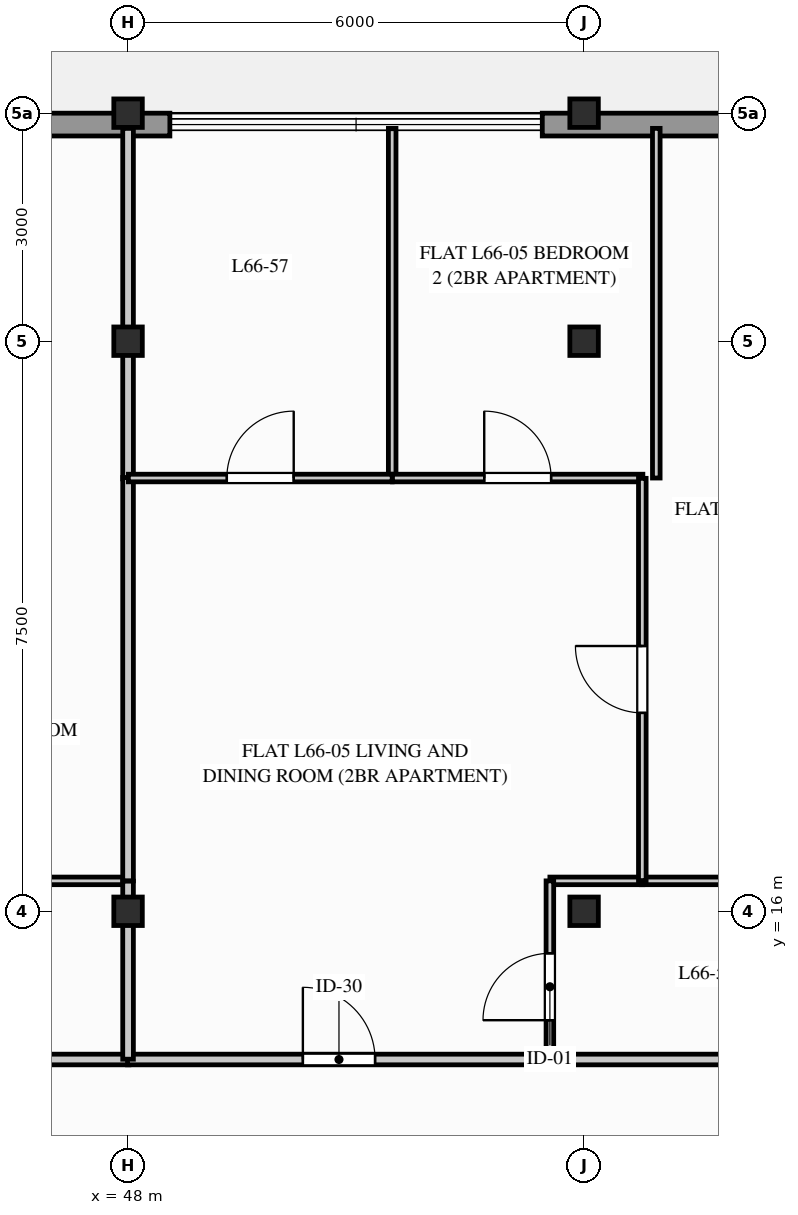
"""IFC4 building model, lengths in metres.
Left out: names, types, materials, properties, quantities, classifications, styles, units other than length and angle.
Written with IfcOpenShell. Run it as: python <this file> out.ifc"""

import sys

from ifc_helpers import new_model, si_unit, direction, frame, frame_2d, origin, origin_2d, place, context, subcontext, project, spatial, rectangle, i_section, extrude, element, fill, save


model = new_model("IFC4")
c1 = context("Model", 3, precision=1e-05, world=origin(), true_north=direction((0.0, 1.0)))
c2 = subcontext(c1, "Body", "Model", "MODEL_VIEW")
j1 = project(units=[si_unit("LENGTHUNIT", "METRE"), si_unit("PLANEANGLEUNIT", "RADIAN")], contexts=[c1])
p1 = place(None, origin())
s1 = spatial("IfcSite", under=j1, at=p1, CompositionType="ELEMENT")
p2 = place(p1, origin())
s2 = spatial("IfcBuilding", under=s1, at=p2, CompositionType="ELEMENT")
p3 = place(p2, frame((0.0, 0.0, 218.0)))
s3 = spatial("IfcBuildingStorey", under=s2, at=p3, CompositionType="ELEMENT", Elevation=218.0)
for number, where, z_axis, x_axis in (
    (1, (48.0, 16.0, 0.0), (0.0, 0.0, 1.0), (1.0, 0.0, 0.0)),
    (2, (48.0, 23.5, 0.0), (0.0, 0.0, 1.0), (1.0, 0.0, 0.0)),
    (3, (48.0, 26.5, 0.0), (0.0, 0.0, 1.0), (1.0, 0.0, 0.0)),
    (4, (54.0, 16.0, 0.0), (0.0, 0.0, 1.0), (1.0, 0.0, 0.0)),
    (5, (54.0, 23.5, 0.0), (0.0, 0.0, 1.0), (1.0, 0.0, 0.0)),
    (6, (54.0, 26.5, 0.0), (0.0, 0.0, 1.0), (1.0, 0.0, 0.0)),
):
    element("IfcColumn", number, at=place(p3, frame(where, z_axis=z_axis, x_axis=x_axis)), inside=s3, PredefinedType="COLUMN", context=c2, shape_type="SweptSolid", body=[
        extrude(i_section(OverallWidth=0.375, OverallDepth=0.375, WebThickness=0.017, FlangeThickness=0.027, FilletRadius=0.015, at=origin_2d()), origin(), (0.0, 0.0, 1.0), 3.1),
    ])
p4 = place(p3, frame((53.45, 26.35, 0.0), z_axis=(0.0, 0.0, 1.0), x_axis=(1.0, 0.0, 0.0)))
e7 = element("IfcWall", 7, at=p4, inside=s3, PredefinedType="STANDARD", context=c2, shape_type="SweptSolid", body=[
    extrude(rectangle(XDim=4.05, YDim=0.3, at=frame_2d((2.025, 0.0))), origin(), (0.0, 0.0, 1.0), 2.89),
])
p5 = place(p3, frame((32.2, 26.35, 0.0), z_axis=(0.0, 0.0, 1.0), x_axis=(1.0, 0.0, 0.0)))
e8 = element("IfcWall", 8, at=p5, inside=s3, PredefinedType="STANDARD", context=c2, shape_type="SweptSolid", body=[
    extrude(rectangle(XDim=16.35, YDim=0.3, at=frame_2d((8.175, 0.0))), origin(), (0.0, 0.0, 1.0), 2.332),
])
p6 = place(p5, frame((7.6, 0.0, 0.0)))
e9 = element("IfcOpeningElement", 9, at=p6, cuts=e8, PredefinedType="OPENING", context=c2, shape_type="SweptSolid", body=[
    extrude(rectangle(XDim=1.1, YDim=2.2, at=frame_2d((0.55, 1.1))), frame((0.0, 0.16, 0.0), z_axis=(0.0, -1.0, 0.0), x_axis=(1.0, 0.0, 0.0)), (0.0, 0.0, 1.0), 0.32),
])
p7 = place(p5, frame((11.5, 0.0, 0.512)))
e10 = element("IfcOpeningElement", 10, at=p7, cuts=e8, PredefinedType="OPENING", context=c2, shape_type="SweptSolid", body=[
    extrude(rectangle(XDim=1.2, YDim=1.6, at=frame_2d((0.6, 0.8))), frame((0.0, 0.16, 0.0), z_axis=(0.0, -1.0, 0.0), x_axis=(1.0, 0.0, 0.0)), (0.0, 0.0, 1.0), 0.32),
])
p8 = place(p5, frame((4.006, 0.0, 0.512)))
e11 = element("IfcOpeningElement", 11, at=p8, cuts=e8, PredefinedType="OPENING", context=c2, shape_type="SweptSolid", body=[
    extrude(rectangle(XDim=1.2, YDim=1.6, at=frame_2d((0.6, 0.8))), frame((0.0, 0.16, 0.0), z_axis=(0.0, -1.0, 0.0), x_axis=(1.0, 0.0, 0.0)), (0.0, 0.0, 1.0), 0.32),
])
p9 = place(p3, frame((41.743, 14.05, 0.0), z_axis=(0.0, 0.0, 1.0), x_axis=(1.0, 0.0, 0.0)))
e12 = element("IfcWall", 12, at=p9, inside=s3, PredefinedType="PARTITIONING", context=c2, shape_type="SweptSolid", body=[
    extrude(rectangle(XDim=6.269, YDim=0.14, at=frame_2d((3.134, 0.0))), origin(), (0.0, 0.0, 1.0), 2.325),
])
p10 = place(p9, frame((2.659, 0.0, 0.0)))
e13 = element("IfcOpeningElement", 13, at=p10, cuts=e12, PredefinedType="OPENING", context=c2, shape_type="SweptSolid", body=[
    extrude(rectangle(XDim=0.95, YDim=2.05, at=frame_2d((0.475, 1.025))), frame((0.0, 0.08, 0.0), z_axis=(0.0, -1.0, 0.0), x_axis=(1.0, 0.0, 0.0)), (0.0, 0.0, 1.0), 0.16),
])
p11 = place(p3, frame((53.539, 14.05, 0.0), z_axis=(0.0, 0.0, 1.0), x_axis=(1.0, 0.0, 0.0)))
e14 = element("IfcWall", 14, at=p11, inside=s3, PredefinedType="PARTITIONING", context=c2, shape_type="SweptSolid", body=[
    extrude(rectangle(XDim=3.219, YDim=0.14, at=frame_2d((1.609, 0.0))), origin(), (0.0, 0.0, 1.0), 2.325),
])
p12 = place(p3, frame((47.993, 14.05, 0.0), z_axis=(0.0, 0.0, 1.0), x_axis=(1.0, 0.0, 0.0)))
e15 = element("IfcWall", 15, at=p12, inside=s3, PredefinedType="PARTITIONING", context=c2, shape_type="SweptSolid", body=[
    extrude(rectangle(XDim=5.565, YDim=0.14, at=frame_2d((2.782, 0.0))), origin(), (0.0, 0.0, 1.0), 2.325),
])
p13 = place(p12, frame((2.307, 0.0, 0.0)))
e16 = element("IfcOpeningElement", 16, at=p13, cuts=e15, PredefinedType="OPENING", context=c2, shape_type="SweptSolid", body=[
    extrude(rectangle(XDim=0.95, YDim=2.05, at=frame_2d((0.475, 1.025))), frame((0.0, 0.08, 0.0), z_axis=(0.0, -1.0, 0.0), x_axis=(1.0, 0.0, 0.0)), (0.0, 0.0, 1.0), 0.16),
])
p14 = place(p3, frame((42.935, 16.4, 0.0), z_axis=(0.0, 0.0, 1.0), x_axis=(1.0, 0.0, 0.0)))
e17 = element("IfcWall", 17, at=p14, inside=s3, PredefinedType="PARTITIONING", context=c2, shape_type="SweptSolid", body=[
    extrude(rectangle(XDim=5.065, YDim=0.1, at=frame_2d((2.532, 0.0))), origin(), (0.0, 0.0, 1.0), 2.325),
])
p15 = place(p3, frame((48.0, 21.689, 0.0), z_axis=(0.0, 0.0, 1.0), x_axis=(0.0, 1.0, 0.0)))
e18 = element("IfcWall", 18, at=p15, inside=s3, PredefinedType="PARTITIONING", context=c2, shape_type="SweptSolid", body=[
    extrude(rectangle(XDim=4.611, YDim=0.14, at=frame_2d((2.306, 0.0))), origin(), (0.0, 0.0, 1.0), 2.325),
])
p16 = place(p3, frame((48.0, 16.4, 0.0), z_axis=(0.0, 0.0, 1.0), x_axis=(0.0, 1.0, 0.0)))
e19 = element("IfcWall", 19, at=p16, inside=s3, PredefinedType="PARTITIONING", context=c2, shape_type="SweptSolid", body=[
    extrude(rectangle(XDim=5.307, YDim=0.14, at=frame_2d((2.654, 0.0))), origin(), (0.0, 0.0, 1.0), 2.325),
])
p17 = place(p3, frame((48.0, 14.054, 0.0), z_axis=(0.0, 0.0, 1.0), x_axis=(0.0, 1.0, 0.0)))
e20 = element("IfcWall", 20, at=p17, inside=s3, PredefinedType="PARTITIONING", context=c2, shape_type="SweptSolid", body=[
    extrude(rectangle(XDim=2.342, YDim=0.14, at=frame_2d((1.171, 0.0))), origin(), (0.0, 0.0, 1.0), 2.325),
])
p18 = place(p3, frame((54.755, 16.4, 0.0), z_axis=(0.0, 0.0, 1.0), x_axis=(1.0, 0.0, 0.0)))
e21 = element("IfcWall", 21, at=p18, inside=s3, PredefinedType="PARTITIONING", context=c2, shape_type="SweptSolid", body=[
    extrude(rectangle(XDim=1.991, YDim=0.1, at=frame_2d((0.996, 0.0))), origin(), (0.0, 0.0, 1.0), 2.89),
])
p19 = place(p3, frame((53.55, 16.4, 0.0), z_axis=(0.0, 0.0, 1.0), x_axis=(1.0, 0.0, 0.0)))
e22 = element("IfcWall", 22, at=p19, inside=s3, PredefinedType="PARTITIONING", context=c2, shape_type="SweptSolid", body=[
    extrude(rectangle(XDim=1.223, YDim=0.1, at=frame_2d((0.612, 0.0))), origin(), (0.0, 0.0, 1.0), 2.325),
])
p20 = place(p3, frame((53.55, 14.054, 0.0), z_axis=(0.0, 0.0, 1.0), x_axis=(0.0, 1.0, 0.0)))
e23 = element("IfcWall", 23, at=p20, inside=s3, PredefinedType="PARTITIONING", context=c2, shape_type="SweptSolid", body=[
    extrude(rectangle(XDim=2.346, YDim=0.1, at=frame_2d((1.173, 0.0))), origin(), (0.0, 0.0, 1.0), 2.325),
])
p21 = place(p20, frame((0.513, 0.0, 0.0)))
e24 = element("IfcOpeningElement", 24, at=p21, cuts=e23, PredefinedType="OPENING", context=c2, shape_type="SweptSolid", body=[
    extrude(rectangle(XDim=0.88, YDim=2.04, at=frame_2d((0.44, 1.02))), frame((0.0, 0.06, 0.0), z_axis=(0.0, -1.0, 0.0), x_axis=(1.0, 0.0, 0.0)), (0.0, 0.0, 1.0), 0.12),
])
p22 = place(p3, frame((51.475, 21.7, 0.0), z_axis=(0.0, 0.0, 1.0), x_axis=(0.0, 1.0, 0.0)))
e25 = element("IfcWall", 25, at=p22, inside=s3, PredefinedType="PARTITIONING", context=c2, shape_type="SweptSolid", body=[
    extrude(rectangle(XDim=4.6, YDim=0.1, at=frame_2d((2.3, 0.0))), origin(), (0.0, 0.0, 1.0), 2.325),
])
p23 = place(p3, frame((48.004, 21.7, 0.0), z_axis=(0.0, 0.0, 1.0), x_axis=(1.0, 0.0, 0.0)))
e26 = element("IfcWall", 26, at=p23, inside=s3, PredefinedType="PARTITIONING", context=c2, shape_type="SweptSolid", body=[
    extrude(rectangle(XDim=3.471, YDim=0.1, at=frame_2d((1.736, 0.0))), origin(), (0.0, 0.0, 1.0), 2.325),
])
p24 = place(p23, frame((1.295, 0.0, 0.0)))
e27 = element("IfcOpeningElement", 27, at=p24, cuts=e26, PredefinedType="OPENING", context=c2, shape_type="SweptSolid", body=[
    extrude(rectangle(XDim=0.88, YDim=2.04, at=frame_2d((0.44, 1.02))), frame((0.0, 0.06, 0.0), z_axis=(0.0, -1.0, 0.0), x_axis=(1.0, 0.0, 0.0)), (0.0, 0.0, 1.0), 0.12),
])
p25 = place(p3, frame((54.95, 21.7, 0.0), z_axis=(0.0, 0.0, 1.0), x_axis=(0.0, 1.0, 0.0)))
e28 = element("IfcWall", 28, at=p25, inside=s3, PredefinedType="PARTITIONING", context=c2, shape_type="SweptSolid", body=[
    extrude(rectangle(XDim=4.6, YDim=0.1, at=frame_2d((2.3, 0.0))), origin(), (0.0, 0.0, 1.0), 2.325),
])
p26 = place(p3, frame((51.479, 21.7, 0.0), z_axis=(0.0, 0.0, 1.0), x_axis=(1.0, 0.0, 0.0)))
e29 = element("IfcWall", 29, at=p26, inside=s3, PredefinedType="PARTITIONING", context=c2, shape_type="SweptSolid", body=[
    extrude(rectangle(XDim=3.294, YDim=0.1, at=frame_2d((1.647, 0.0))), origin(), (0.0, 0.0, 1.0), 2.325),
])
p27 = place(p26, frame((1.207, 0.0, 0.0)))
e30 = element("IfcOpeningElement", 30, at=p27, cuts=e29, PredefinedType="OPENING", context=c2, shape_type="SweptSolid", body=[
    extrude(rectangle(XDim=0.88, YDim=2.04, at=frame_2d((0.44, 1.02))), frame((0.0, 0.06, 0.0), z_axis=(0.0, -1.0, 0.0), x_axis=(1.0, 0.0, 0.0)), (0.0, 0.0, 1.0), 0.12),
])
p28 = place(p3, frame((54.766, 16.404, 0.0), z_axis=(0.0, 0.0, 1.0), x_axis=(0.0, 1.0, 0.0)))
e31 = element("IfcWall", 31, at=p28, inside=s3, PredefinedType="PARTITIONING", context=c2, shape_type="SweptSolid", body=[
    extrude(rectangle(XDim=5.292, YDim=0.1, at=frame_2d((2.646, 0.0))), origin(), (0.0, 0.0, 1.0), 2.614),
])
p29 = place(p28, frame((2.206, 0.0, 0.0)))
e32 = element("IfcOpeningElement", 32, at=p29, cuts=e31, PredefinedType="OPENING", context=c2, shape_type="SweptSolid", body=[
    extrude(rectangle(XDim=0.88, YDim=2.04, at=frame_2d((0.44, 1.02))), frame((0.0, 0.06, 0.0), z_axis=(0.0, -1.0, 0.0), x_axis=(1.0, 0.0, 0.0)), (0.0, 0.0, 1.0), 0.12),
])
p30 = place(p13, origin())
e33 = element("IfcDoor", 33, at=p30, inside=s3, OperationType="SINGLE_SWING_LEFT", PredefinedType="DOOR", context=c2, shape_type="SweptSolid", body=[
    extrude(rectangle(XDim=0.95, YDim=2.05, at=frame_2d((0.475, 1.025))), frame((0.0, 0.025, 0.0), z_axis=(0.0, -1.0, 0.0), x_axis=(1.0, 0.0, 0.0)), (0.0, 0.0, 1.0), 0.05),
])
fill(e16, e33)
p31 = place(p21, origin())
e34 = element("IfcDoor", 34, at=p31, inside=s3, OperationType="SINGLE_SWING_LEFT", PredefinedType="DOOR", context=c2, shape_type="SweptSolid", body=[
    extrude(rectangle(XDim=0.88, YDim=2.04, at=frame_2d((0.44, 1.02))), frame((0.0, 0.025, 0.0), z_axis=(0.0, -1.0, 0.0), x_axis=(1.0, 0.0, 0.0)), (0.0, 0.0, 1.0), 0.05),
])
fill(e24, e34)
p32 = place(p24, origin())
e35 = element("IfcDoor", 35, at=p32, inside=s3, OperationType="SINGLE_SWING_RIGHT", PredefinedType="DOOR", context=c2, shape_type="SweptSolid", body=[
    extrude(rectangle(XDim=0.88, YDim=2.04, at=frame_2d((0.44, 1.02))), frame((0.0, 0.025, 0.0), z_axis=(0.0, -1.0, 0.0), x_axis=(1.0, 0.0, 0.0)), (0.0, 0.0, 1.0), 0.05),
])
fill(e27, e35)
p33 = place(p27, origin())
e36 = element("IfcDoor", 36, at=p33, inside=s3, OperationType="SINGLE_SWING_LEFT", PredefinedType="DOOR", context=c2, shape_type="SweptSolid", body=[
    extrude(rectangle(XDim=0.88, YDim=2.04, at=frame_2d((0.44, 1.02))), frame((0.0, 0.025, 0.0), z_axis=(0.0, -1.0, 0.0), x_axis=(1.0, 0.0, 0.0)), (0.0, 0.0, 1.0), 0.05),
])
fill(e30, e36)
p34 = place(p29, origin())
e37 = element("IfcDoor", 37, at=p34, inside=s3, OperationType="SINGLE_SWING_RIGHT", PredefinedType="DOOR", context=c2, shape_type="SweptSolid", body=[
    extrude(rectangle(XDim=0.88, YDim=2.04, at=frame_2d((0.44, 1.02))), frame((0.0, 0.025, 0.0), z_axis=(0.0, -1.0, 0.0), x_axis=(1.0, 0.0, 0.0)), (0.0, 0.0, 1.0), 0.05),
])
fill(e32, e37)
save(model, sys.argv[1])
